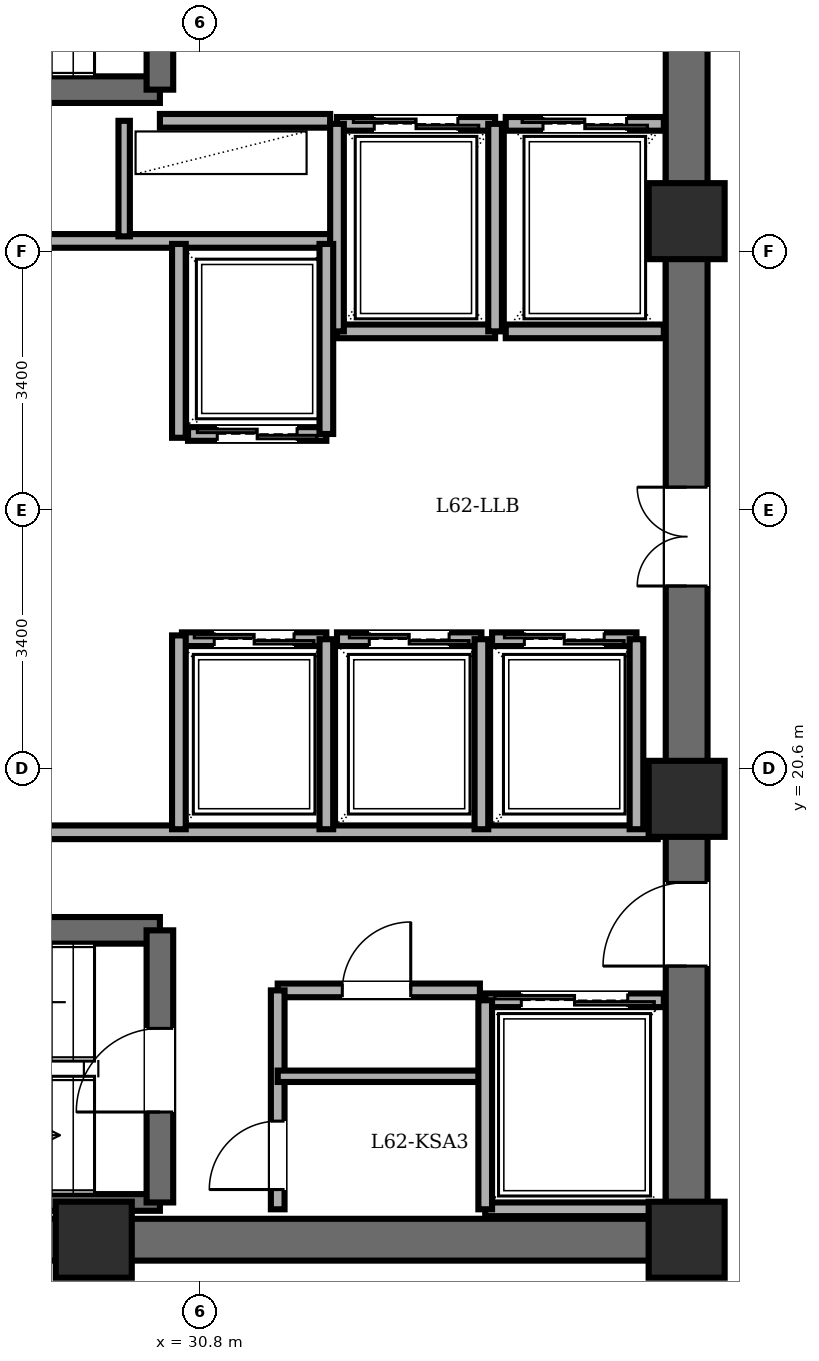
"""IFC4 building model, lengths in metres.
Left out: names, types, materials, properties, quantities, classifications, styles, units other than length and angle.
Written with IfcOpenShell. Run it as: python <this file> out.ifc"""

import sys

from ifc_helpers import new_model, si_unit, direction, frame, frame_2d, origin, origin_2d, place, context, subcontext, project, spatial, rectangle, extrude, element, fill, save


model = new_model("IFC4")
c1 = context("Model", 3, precision=1e-05, world=origin(), true_north=direction((0.0, 1.0)))
c2 = subcontext(c1, "Body", "Model", "MODEL_VIEW")
j1 = project(units=[si_unit("LENGTHUNIT", "METRE"), si_unit("PLANEANGLEUNIT", "RADIAN")], contexts=[c1])
p1 = place(None, origin())
s1 = spatial("IfcSite", under=j1, at=p1, CompositionType="ELEMENT")
p2 = place(p1, origin())
s2 = spatial("IfcBuilding", under=s1, at=p2, CompositionType="ELEMENT")
p3 = place(p2, frame((0.0, 0.0, 237.3)))
s3 = spatial("IfcBuildingStorey", under=s2, at=p3, CompositionType="ELEMENT", Elevation=237.3)
for number, where, z_axis, x_axis in (
    (1, (29.4, 14.4, 0.0), (0.0, 0.0, 1.0), (1.0, 0.0, 0.0)),
    (2, (37.2, 14.4, 0.0), (0.0, 0.0, 1.0), (1.0, 0.0, 0.0)),
    (3, (37.2, 20.2, 0.0), (0.0, 0.0, 1.0), (1.0, 0.0, 0.0)),
    (4, (37.2, 27.8, 0.0), (0.0, 0.0, 1.0), (1.0, 0.0, 0.0)),
):
    element("IfcColumn", number, at=place(p3, frame(where, z_axis=z_axis, x_axis=x_axis)), inside=s3, PredefinedType="COLUMN", context=c2, shape_type="SweptSolid", body=[
        extrude(rectangle(XDim=1.0, YDim=1.0, at=origin_2d()), origin(), (0.0, 0.0, 1.0), 3.6),
    ])
p4 = place(p3, frame((37.2, 14.4, 0.0), z_axis=(0.0, 0.0, 1.0), x_axis=(-1.0, 0.0, 0.0)))
e5 = element("IfcWall", 5, at=p4, inside=s3, PredefinedType="SHEAR", context=c2, shape_type="SweptSolid", body=[
    extrude(rectangle(XDim=15.6, YDim=0.55, at=frame_2d((7.8, 0.0))), origin(), (0.0, 0.0, 1.0), 3.4),
])
p5 = place(p3, frame((37.2, 14.4, 0.0), z_axis=(0.0, 0.0, 1.0), x_axis=(0.0, 1.0, 0.0)))
e6 = element("IfcWall", 6, at=p5, inside=s3, PredefinedType="SHEAR", context=c2, shape_type="SweptSolid", body=[
    extrude(rectangle(XDim=19.2, YDim=0.55, at=frame_2d((9.6, 0.0))), origin(), (0.0, 0.0, 1.0), 3.4),
])
p6 = place(p5, frame((15.8, 0.0, 0.0)))
e7 = element("IfcOpeningElement", 7, at=p6, cuts=e6, PredefinedType="OPENING", context=c2, shape_type="SweptSolid", body=[
    extrude(rectangle(XDim=1.15, YDim=2.15, at=frame_2d((0.575, 1.075))), frame((0.0, 0.285, 0.0), z_axis=(0.0, -1.0, 0.0), x_axis=(1.0, 0.0, 0.0)), (0.0, 0.0, 1.0), 0.57),
])
p7 = place(p5, frame((3.6, 0.0, 0.0)))
e8 = element("IfcOpeningElement", 8, at=p7, cuts=e6, PredefinedType="OPENING", context=c2, shape_type="SweptSolid", body=[
    extrude(rectangle(XDim=1.1, YDim=2.15, at=frame_2d((0.55, 1.075))), frame((0.0, 0.285, 0.0), z_axis=(0.0, -1.0, 0.0), x_axis=(1.0, 0.0, 0.0)), (0.0, 0.0, 1.0), 0.57),
])
p8 = place(p5, frame((8.6, 0.0, 0.0)))
e9 = element("IfcOpeningElement", 9, at=p8, cuts=e6, PredefinedType="OPENING", context=c2, shape_type="SweptSolid", body=[
    extrude(rectangle(XDim=1.3, YDim=2.2, at=frame_2d((0.65, 1.1))), frame((0.0, 0.285, 0.0), z_axis=(0.0, -1.0, 0.0), x_axis=(1.0, 0.0, 0.0)), (0.0, 0.0, 1.0), 0.57),
])
p9 = place(p3, frame((22.48, 29.53, 0.0), z_axis=(0.0, 0.0, 1.0), x_axis=(1.0, 0.0, 0.0)))
e10 = element("IfcWall", 10, at=p9, inside=s3, PredefinedType="SOLIDWALL", context=c2, shape_type="SweptSolid", body=[
    extrude(rectangle(XDim=7.79, YDim=0.35, at=frame_2d((3.895, 0.0))), origin(), (0.0, 0.0, 1.0), 3.4),
])
p10 = place(p3, frame((30.27, 29.53, 0.0), z_axis=(0.0, 0.0, 1.0), x_axis=(0.0, 1.0, 0.0)))
e11 = element("IfcWall", 11, at=p10, inside=s3, PredefinedType="SOLIDWALL", context=c2, shape_type="SweptSolid", body=[
    extrude(rectangle(XDim=3.58, YDim=0.35, at=frame_2d((1.79, 0.0))), origin(), (0.0, 0.0, 1.0), 3.4),
])
p11 = place(p10, frame((1.25, 0.0, 0.0)))
e12 = element("IfcOpeningElement", 12, at=p11, cuts=e11, PredefinedType="OPENING", context=c2, shape_type="SweptSolid", body=[
    extrude(rectangle(XDim=1.1, YDim=2.15, at=frame_2d((0.55, 1.075))), frame((0.0, 0.185, 0.0), z_axis=(0.0, -1.0, 0.0), x_axis=(1.0, 0.0, 0.0)), (0.0, 0.0, 1.0), 0.37),
])
p12 = place(p3, frame((22.48, 18.47, 0.0), z_axis=(0.0, 0.0, 1.0), x_axis=(1.0, 0.0, 0.0)))
e13 = element("IfcWall", 13, at=p12, inside=s3, PredefinedType="SOLIDWALL", context=c2, shape_type="SweptSolid", body=[
    extrude(rectangle(XDim=7.79, YDim=0.35, at=frame_2d((3.895, 0.0))), origin(), (0.0, 0.0, 1.0), 3.4),
])
p13 = place(p3, frame((22.48, 14.89, 0.0), z_axis=(0.0, 0.0, 1.0), x_axis=(1.0, 0.0, 0.0)))
e14 = element("IfcWall", 14, at=p13, inside=s3, PredefinedType="PARTITIONING", context=c2, shape_type="SweptSolid", body=[
    extrude(rectangle(XDim=7.79, YDim=0.22, at=frame_2d((3.895, 0.0))), origin(), (0.0, 0.0, 1.0), 3.4),
])
p14 = place(p3, frame((30.27, 14.89, 0.0), z_axis=(0.0, 0.0, 1.0), x_axis=(0.0, 1.0, 0.0)))
e15 = element("IfcWall", 15, at=p14, inside=s3, PredefinedType="SOLIDWALL", context=c2, shape_type="SweptSolid", body=[
    extrude(rectangle(XDim=3.58, YDim=0.35, at=frame_2d((1.79, 0.0))), origin(), (0.0, 0.0, 1.0), 3.4),
])
p15 = place(p14, frame((1.19, 0.0, 0.0)))
e16 = element("IfcOpeningElement", 16, at=p15, cuts=e15, PredefinedType="OPENING", context=c2, shape_type="SweptSolid", body=[
    extrude(rectangle(XDim=1.1, YDim=2.15, at=frame_2d((0.55, 1.075))), frame((0.0, 0.185, 0.0), z_axis=(0.0, -1.0, 0.0), x_axis=(1.0, 0.0, 0.0)), (0.0, 0.0, 1.0), 0.37),
])
p16 = place(p3, frame((30.27, 29.12, 0.0), z_axis=(0.0, 0.0, 1.0), x_axis=(1.0, 0.0, 0.0)))
e17 = element("IfcWall", 17, at=p16, inside=s3, PredefinedType="PARTITIONING", context=c2, shape_type="SweptSolid", body=[
    extrude(rectangle(XDim=2.24, YDim=0.18, at=frame_2d((1.12, 0.0))), origin(), (0.0, 0.0, 1.0), 3.4),
])
p17 = place(p3, frame((21.95, 27.54, 0.0), z_axis=(0.0, 0.0, 1.0), x_axis=(1.0, 0.0, 0.0)))
e18 = element("IfcWall", 18, at=p17, inside=s3, PredefinedType="PARTITIONING", context=c2, shape_type="SweptSolid", body=[
    extrude(rectangle(XDim=10.56, YDim=0.18, at=frame_2d((5.28, 0.0))), origin(), (0.0, 0.0, 1.0), 3.4),
])
p18 = place(p3, frame((29.8, 27.6, 0.0), z_axis=(0.0, 0.0, 1.0), x_axis=(0.0, 1.0, 0.0)))
e19 = element("IfcWall", 19, at=p18, inside=s3, PredefinedType="PARTITIONING", context=c2, shape_type="SweptSolid", body=[
    extrude(rectangle(XDim=1.52, YDim=0.15, at=frame_2d((0.76, 0.0))), origin(), (0.0, 0.0, 1.0), 3.4),
])
p19 = place(p3, frame((21.95, 19.76, 0.0), z_axis=(0.0, 0.0, 1.0), x_axis=(1.0, 0.0, 0.0)))
e20 = element("IfcWall", 20, at=p19, inside=s3, PredefinedType="PARTITIONING", context=c2, shape_type="SweptSolid", body=[
    extrude(rectangle(XDim=14.87, YDim=0.18, at=frame_2d((7.435, 0.0))), origin(), (0.0, 0.0, 1.0), 3.4),
])
p20 = place(p3, frame((31.82, 17.68, 0.0), z_axis=(0.0, 0.0, 1.0), x_axis=(1.0, 0.0, 0.0)))
e21 = element("IfcWall", 21, at=p20, inside=s3, PredefinedType="PARTITIONING", context=c2, shape_type="SweptSolid", body=[
    extrude(rectangle(XDim=2.66, YDim=0.18, at=frame_2d((1.33, 0.0))), origin(), (0.0, 0.0, 1.0), 3.4),
])
p21 = place(p20, frame((0.85, 0.0, 0.0)))
e22 = element("IfcOpeningElement", 22, at=p21, cuts=e21, PredefinedType="OPENING", context=c2, shape_type="SweptSolid", body=[
    extrude(rectangle(XDim=0.9, YDim=2.05, at=frame_2d((0.45, 1.025))), frame((0.0, 0.1, 0.0), z_axis=(0.0, -1.0, 0.0), x_axis=(1.0, 0.0, 0.0)), (0.0, 0.0, 1.0), 0.2),
])
p22 = place(p3, frame((31.82, 14.8, 0.0), z_axis=(0.0, 0.0, 1.0), x_axis=(0.0, 1.0, 0.0)))
e23 = element("IfcWall", 23, at=p22, inside=s3, PredefinedType="PARTITIONING", context=c2, shape_type="SweptSolid", body=[
    extrude(rectangle(XDim=2.88, YDim=0.18, at=frame_2d((1.44, 0.0))), origin(), (0.0, 0.0, 1.0), 3.4),
])
p23 = place(p22, frame((0.26, 0.0, 0.0)))
e24 = element("IfcOpeningElement", 24, at=p23, cuts=e23, PredefinedType="OPENING", context=c2, shape_type="SweptSolid", body=[
    extrude(rectangle(XDim=0.9, YDim=2.05, at=frame_2d((0.45, 1.025))), frame((0.0, 0.1, 0.0), z_axis=(0.0, -1.0, 0.0), x_axis=(1.0, 0.0, 0.0)), (0.0, 0.0, 1.0), 0.2),
])
p24 = place(p3, frame((31.82, 16.55, 0.0), z_axis=(0.0, 0.0, 1.0), x_axis=(1.0, 0.0, 0.0)))
e25 = element("IfcWall", 25, at=p24, inside=s3, PredefinedType="PARTITIONING", context=c2, shape_type="SweptSolid", body=[
    extrude(rectangle(XDim=2.66, YDim=0.15, at=frame_2d((1.33, 0.0))), origin(), (0.0, 0.0, 1.0), 3.4),
])
p25 = place(p3, frame((32.6, 29.08, 0.0), z_axis=(0.0, 0.0, 1.0), x_axis=(1.0, 0.0, 0.0)))
e26 = element("IfcWall", 26, at=p25, inside=s3, PredefinedType="PARTITIONING", context=c2, shape_type="SweptSolid", body=[
    extrude(rectangle(XDim=2.08, YDim=0.18, at=frame_2d((1.04, 0.0))), origin(), (0.0, 0.0, 1.0), 3.4),
])
p26 = place(p25, frame((0.49, 0.0, 0.0)))
e27 = element("IfcOpeningElement", 27, at=p26, cuts=e26, PredefinedType="OPENING", context=c2, shape_type="SweptSolid", body=[
    extrude(rectangle(XDim=1.1, YDim=2.2, at=frame_2d((0.55, 1.1))), frame((0.0, 0.1, 0.0), z_axis=(0.0, -1.0, 0.0), x_axis=(1.0, 0.0, 0.0)), (0.0, 0.0, 1.0), 0.2),
])
p27 = place(p3, frame((34.68, 26.35, 0.0), z_axis=(0.0, 0.0, 1.0), x_axis=(-1.0, 0.0, 0.0)))
e28 = element("IfcWall", 28, at=p27, inside=s3, PredefinedType="PARTITIONING", context=c2, shape_type="SweptSolid", body=[
    extrude(rectangle(XDim=2.08, YDim=0.18, at=frame_2d((1.04, 0.0))), origin(), (0.0, 0.0, 1.0), 3.4),
])
for number, where, z_axis, x_axis in (
    (29, (34.68, 26.35, 0.0), (0.0, 0.0, 1.0), (0.0, 1.0, 0.0)),
    (30, (32.6, 29.08, 0.0), (0.0, 0.0, 1.0), (0.0, -1.0, 0.0)),
):
    element("IfcWall", number, at=place(p3, frame(where, z_axis=z_axis, x_axis=x_axis)), inside=s3, PredefinedType="PARTITIONING", context=c2, shape_type="SweptSolid", body=[
        extrude(rectangle(XDim=2.73, YDim=0.18, at=frame_2d((1.365, 0.0))), origin(), (0.0, 0.0, 1.0), 3.4),
    ])
p28 = place(p3, frame((34.82, 29.08, 0.0), z_axis=(0.0, 0.0, 1.0), x_axis=(1.0, 0.0, 0.0)))
e31 = element("IfcWall", 31, at=p28, inside=s3, PredefinedType="PARTITIONING", context=c2, shape_type="SweptSolid", body=[
    extrude(rectangle(XDim=2.08, YDim=0.18, at=frame_2d((1.04, 0.0))), origin(), (0.0, 0.0, 1.0), 3.4),
])
p29 = place(p28, frame((0.49, 0.0, 0.0)))
e32 = element("IfcOpeningElement", 32, at=p29, cuts=e31, PredefinedType="OPENING", context=c2, shape_type="SweptSolid", body=[
    extrude(rectangle(XDim=1.1, YDim=2.2, at=frame_2d((0.55, 1.1))), frame((0.0, 0.1, 0.0), z_axis=(0.0, -1.0, 0.0), x_axis=(1.0, 0.0, 0.0)), (0.0, 0.0, 1.0), 0.2),
])
p30 = place(p3, frame((36.9, 26.35, 0.0), z_axis=(0.0, 0.0, 1.0), x_axis=(-1.0, 0.0, 0.0)))
e33 = element("IfcWall", 33, at=p30, inside=s3, PredefinedType="PARTITIONING", context=c2, shape_type="SweptSolid", body=[
    extrude(rectangle(XDim=2.08, YDim=0.18, at=frame_2d((1.04, 0.0))), origin(), (0.0, 0.0, 1.0), 3.4),
])
p31 = place(p3, frame((34.55, 17.55, 0.0), z_axis=(0.0, 0.0, 1.0), x_axis=(1.0, 0.0, 0.0)))
e34 = element("IfcWall", 34, at=p31, inside=s3, PredefinedType="PARTITIONING", context=c2, shape_type="SweptSolid", body=[
    extrude(rectangle(XDim=2.35, YDim=0.18, at=frame_2d((1.175, 0.0))), origin(), (0.0, 0.0, 1.0), 3.4),
])
p32 = place(p31, frame((0.475, 0.0, 0.0)))
e35 = element("IfcOpeningElement", 35, at=p32, cuts=e34, PredefinedType="OPENING", context=c2, shape_type="SweptSolid", body=[
    extrude(rectangle(XDim=1.4, YDim=2.3, at=frame_2d((0.7, 1.15))), frame((0.0, 0.1, 0.0), z_axis=(0.0, -1.0, 0.0), x_axis=(1.0, 0.0, 0.0)), (0.0, 0.0, 1.0), 0.2),
])
p33 = place(p3, frame((36.9, 14.8, 0.0), z_axis=(0.0, 0.0, 1.0), x_axis=(-1.0, 0.0, 0.0)))
e36 = element("IfcWall", 36, at=p33, inside=s3, PredefinedType="PARTITIONING", context=c2, shape_type="SweptSolid", body=[
    extrude(rectangle(XDim=2.35, YDim=0.18, at=frame_2d((1.175, 0.0))), origin(), (0.0, 0.0, 1.0), 3.4),
])
p34 = place(p3, frame((34.55, 17.55, 0.0), z_axis=(0.0, 0.0, 1.0), x_axis=(0.0, -1.0, 0.0)))
e37 = element("IfcWall", 37, at=p34, inside=s3, PredefinedType="PARTITIONING", context=c2, shape_type="SweptSolid", body=[
    extrude(rectangle(XDim=2.75, YDim=0.18, at=frame_2d((1.375, 0.0))), origin(), (0.0, 0.0, 1.0), 3.4),
])
p35 = place(p3, frame((32.46, 25.0, 0.0), z_axis=(0.0, 0.0, 1.0), x_axis=(-1.0, 0.0, 0.0)))
e38 = element("IfcWall", 38, at=p35, inside=s3, PredefinedType="PARTITIONING", context=c2, shape_type="SweptSolid", body=[
    extrude(rectangle(XDim=1.82, YDim=0.18, at=frame_2d((0.91, 0.0))), origin(), (0.0, 0.0, 1.0), 3.4),
])
p36 = place(p35, frame((0.385, 0.0, 0.0)))
e39 = element("IfcOpeningElement", 39, at=p36, cuts=e38, PredefinedType="OPENING", context=c2, shape_type="SweptSolid", body=[
    extrude(rectangle(XDim=1.05, YDim=2.2, at=frame_2d((0.525, 1.1))), frame((0.0, 0.1, 0.0), z_axis=(0.0, -1.0, 0.0), x_axis=(1.0, 0.0, 0.0)), (0.0, 0.0, 1.0), 0.2),
])
p37 = place(p3, frame((32.46, 25.0, 0.0), z_axis=(0.0, 0.0, 1.0), x_axis=(0.0, 1.0, 0.0)))
e40 = element("IfcWall", 40, at=p37, inside=s3, PredefinedType="PARTITIONING", context=c2, shape_type="SweptSolid", body=[
    extrude(rectangle(XDim=2.5, YDim=0.18, at=frame_2d((1.25, 0.0))), origin(), (0.0, 0.0, 1.0), 3.4),
])
p38 = place(p3, frame((30.56, 22.3, 0.0), z_axis=(0.0, 0.0, 1.0), x_axis=(1.0, 0.0, 0.0)))
e41 = element("IfcWall", 41, at=p38, inside=s3, PredefinedType="PARTITIONING", context=c2, shape_type="SweptSolid", body=[
    extrude(rectangle(XDim=1.9, YDim=0.18, at=frame_2d((0.95, 0.0))), origin(), (0.0, 0.0, 1.0), 3.4),
])
p39 = place(p38, frame((0.425, 0.0, 0.0)))
e42 = element("IfcOpeningElement", 42, at=p39, cuts=e41, PredefinedType="OPENING", context=c2, shape_type="SweptSolid", body=[
    extrude(rectangle(XDim=1.05, YDim=2.2, at=frame_2d((0.525, 1.1))), frame((0.0, 0.1, 0.0), z_axis=(0.0, -1.0, 0.0), x_axis=(1.0, 0.0, 0.0)), (0.0, 0.0, 1.0), 0.2),
])
p40 = place(p3, frame((32.46, 19.8, 0.0), z_axis=(0.0, 0.0, 1.0), x_axis=(0.0, 1.0, 0.0)))
e43 = element("IfcWall", 43, at=p40, inside=s3, PredefinedType="PARTITIONING", context=c2, shape_type="SweptSolid", body=[
    extrude(rectangle(XDim=2.5, YDim=0.18, at=frame_2d((1.25, 0.0))), origin(), (0.0, 0.0, 1.0), 3.4),
])
p41 = place(p3, frame((32.6, 22.3, 0.0), z_axis=(0.0, 0.0, 1.0), x_axis=(1.0, 0.0, 0.0)))
e44 = element("IfcWall", 44, at=p41, inside=s3, PredefinedType="PARTITIONING", context=c2, shape_type="SweptSolid", body=[
    extrude(rectangle(XDim=1.9, YDim=0.18, at=frame_2d((0.95, 0.0))), origin(), (0.0, 0.0, 1.0), 3.4),
])
p42 = place(p41, frame((0.425, 0.0, 0.0)))
e45 = element("IfcOpeningElement", 45, at=p42, cuts=e44, PredefinedType="OPENING", context=c2, shape_type="SweptSolid", body=[
    extrude(rectangle(XDim=1.05, YDim=2.2, at=frame_2d((0.525, 1.1))), frame((0.0, 0.1, 0.0), z_axis=(0.0, -1.0, 0.0), x_axis=(1.0, 0.0, 0.0)), (0.0, 0.0, 1.0), 0.2),
])
p43 = place(p3, frame((34.5, 19.8, 0.0), z_axis=(0.0, 0.0, 1.0), x_axis=(0.0, 1.0, 0.0)))
e46 = element("IfcWall", 46, at=p43, inside=s3, PredefinedType="PARTITIONING", context=c2, shape_type="SweptSolid", body=[
    extrude(rectangle(XDim=2.5, YDim=0.18, at=frame_2d((1.25, 0.0))), origin(), (0.0, 0.0, 1.0), 3.4),
])
p44 = place(p3, frame((34.64, 22.3, 0.0), z_axis=(0.0, 0.0, 1.0), x_axis=(1.0, 0.0, 0.0)))
e47 = element("IfcWall", 47, at=p44, inside=s3, PredefinedType="PARTITIONING", context=c2, shape_type="SweptSolid", body=[
    extrude(rectangle(XDim=1.9, YDim=0.18, at=frame_2d((0.95, 0.0))), origin(), (0.0, 0.0, 1.0), 3.4),
])
p45 = place(p44, frame((0.425, 0.0, 0.0)))
e48 = element("IfcOpeningElement", 48, at=p45, cuts=e47, PredefinedType="OPENING", context=c2, shape_type="SweptSolid", body=[
    extrude(rectangle(XDim=1.05, YDim=2.2, at=frame_2d((0.525, 1.1))), frame((0.0, 0.1, 0.0), z_axis=(0.0, -1.0, 0.0), x_axis=(1.0, 0.0, 0.0)), (0.0, 0.0, 1.0), 0.2),
])
p46 = place(p3, frame((36.54, 19.8, 0.0), z_axis=(0.0, 0.0, 1.0), x_axis=(0.0, 1.0, 0.0)))
e49 = element("IfcWall", 49, at=p46, inside=s3, PredefinedType="PARTITIONING", context=c2, shape_type="SweptSolid", body=[
    extrude(rectangle(XDim=2.5, YDim=0.18, at=frame_2d((1.25, 0.0))), origin(), (0.0, 0.0, 1.0), 3.4),
])
for number, where, z_axis, x_axis in (
    (50, (30.52, 24.95, 0.0), (0.0, 0.0, 1.0), (0.0, 1.0, 0.0)),
    (51, (30.52, 19.8, 0.0), (0.0, 0.0, 1.0), (0.0, 1.0, 0.0)),
):
    element("IfcWall", number, at=place(p3, frame(where, z_axis=z_axis, x_axis=x_axis)), inside=s3, PredefinedType="PARTITIONING", context=c2, shape_type="SweptSolid", body=[
        extrude(rectangle(XDim=2.55, YDim=0.18, at=frame_2d((1.275, 0.0))), origin(), (0.0, 0.0, 1.0), 3.4),
    ])
p47 = place(p15, origin())
e52 = element("IfcDoor", 52, at=p47, inside=s3, OperationType="SINGLE_SWING_LEFT", PredefinedType="DOOR", context=c2, shape_type="SweptSolid", body=[
    extrude(rectangle(XDim=1.1, YDim=2.15, at=frame_2d((0.55, 1.075))), frame((0.0, 0.025, 0.0), z_axis=(0.0, -1.0, 0.0), x_axis=(1.0, 0.0, 0.0)), (0.0, 0.0, 1.0), 0.05),
])
fill(e16, e52)
p48 = place(p7, origin())
e53 = element("IfcDoor", 53, at=p48, inside=s3, OperationType="SINGLE_SWING_LEFT", PredefinedType="DOOR", context=c2, shape_type="SweptSolid", body=[
    extrude(rectangle(XDim=1.1, YDim=2.15, at=frame_2d((0.55, 1.075))), frame((0.0, 0.025, 0.0), z_axis=(0.0, -1.0, 0.0), x_axis=(1.0, 0.0, 0.0)), (0.0, 0.0, 1.0), 0.05),
])
fill(e8, e53)
p49 = place(p21, origin())
e54 = element("IfcDoor", 54, at=p49, inside=s3, OperationType="SINGLE_SWING_RIGHT", PredefinedType="DOOR", context=c2, shape_type="SweptSolid", body=[
    extrude(rectangle(XDim=0.9, YDim=2.05, at=frame_2d((0.45, 1.025))), frame((0.0, 0.025, 0.0), z_axis=(0.0, -1.0, 0.0), x_axis=(1.0, 0.0, 0.0)), (0.0, 0.0, 1.0), 0.05),
])
fill(e22, e54)
p50 = place(p23, origin())
e55 = element("IfcDoor", 55, at=p50, inside=s3, OperationType="SINGLE_SWING_LEFT", PredefinedType="DOOR", context=c2, shape_type="SweptSolid", body=[
    extrude(rectangle(XDim=0.9, YDim=2.05, at=frame_2d((0.45, 1.025))), frame((0.0, 0.025, 0.0), z_axis=(0.0, -1.0, 0.0), x_axis=(1.0, 0.0, 0.0)), (0.0, 0.0, 1.0), 0.05),
])
fill(e24, e55)
p51 = place(p26, origin())
e56 = element("IfcDoor", 56, at=p51, inside=s3, OperationType="DOUBLE_DOOR_SLIDING", PredefinedType="DOOR", context=c2, shape_type="SweptSolid", body=[
    extrude(rectangle(XDim=1.1, YDim=2.2, at=frame_2d((0.55, 1.1))), frame((0.0, 0.025, 0.0), z_axis=(0.0, -1.0, 0.0), x_axis=(1.0, 0.0, 0.0)), (0.0, 0.0, 1.0), 0.05),
])
fill(e27, e56)
p52 = place(p29, origin())
e57 = element("IfcDoor", 57, at=p52, inside=s3, OperationType="DOUBLE_DOOR_SLIDING", PredefinedType="DOOR", context=c2, shape_type="SweptSolid", body=[
    extrude(rectangle(XDim=1.1, YDim=2.2, at=frame_2d((0.55, 1.1))), frame((0.0, 0.025, 0.0), z_axis=(0.0, -1.0, 0.0), x_axis=(1.0, 0.0, 0.0)), (0.0, 0.0, 1.0), 0.05),
])
fill(e32, e57)
p53 = place(p32, origin())
e58 = element("IfcDoor", 58, at=p53, inside=s3, OperationType="DOUBLE_DOOR_SLIDING", PredefinedType="DOOR", context=c2, shape_type="SweptSolid", body=[
    extrude(rectangle(XDim=1.4, YDim=2.3, at=frame_2d((0.7, 1.15))), frame((0.0, 0.025, 0.0), z_axis=(0.0, -1.0, 0.0), x_axis=(1.0, 0.0, 0.0)), (0.0, 0.0, 1.0), 0.05),
])
fill(e35, e58)
p54 = place(p36, origin())
e59 = element("IfcDoor", 59, at=p54, inside=s3, OperationType="DOUBLE_DOOR_SLIDING", PredefinedType="DOOR", context=c2, shape_type="SweptSolid", body=[
    extrude(rectangle(XDim=1.05, YDim=2.2, at=frame_2d((0.525, 1.1))), frame((0.0, 0.025, 0.0), z_axis=(0.0, -1.0, 0.0), x_axis=(1.0, 0.0, 0.0)), (0.0, 0.0, 1.0), 0.05),
])
fill(e39, e59)
p55 = place(p39, origin())
e60 = element("IfcDoor", 60, at=p55, inside=s3, OperationType="DOUBLE_DOOR_SLIDING", PredefinedType="DOOR", context=c2, shape_type="SweptSolid", body=[
    extrude(rectangle(XDim=1.05, YDim=2.2, at=frame_2d((0.525, 1.1))), frame((0.0, 0.025, 0.0), z_axis=(0.0, -1.0, 0.0), x_axis=(1.0, 0.0, 0.0)), (0.0, 0.0, 1.0), 0.05),
])
fill(e42, e60)
p56 = place(p42, origin())
e61 = element("IfcDoor", 61, at=p56, inside=s3, OperationType="DOUBLE_DOOR_SLIDING", PredefinedType="DOOR", context=c2, shape_type="SweptSolid", body=[
    extrude(rectangle(XDim=1.05, YDim=2.2, at=frame_2d((0.525, 1.1))), frame((0.0, 0.025, 0.0), z_axis=(0.0, -1.0, 0.0), x_axis=(1.0, 0.0, 0.0)), (0.0, 0.0, 1.0), 0.05),
])
fill(e45, e61)
p57 = place(p45, origin())
e62 = element("IfcDoor", 62, at=p57, inside=s3, OperationType="DOUBLE_DOOR_SLIDING", PredefinedType="DOOR", context=c2, shape_type="SweptSolid", body=[
    extrude(rectangle(XDim=1.05, YDim=2.2, at=frame_2d((0.525, 1.1))), frame((0.0, 0.025, 0.0), z_axis=(0.0, -1.0, 0.0), x_axis=(1.0, 0.0, 0.0)), (0.0, 0.0, 1.0), 0.05),
])
fill(e48, e62)
p58 = place(p8, origin())
e63 = element("IfcDoor", 63, at=p58, inside=s3, OperationType="DOUBLE_DOOR_SINGLE_SWING", PredefinedType="DOOR", context=c2, shape_type="SweptSolid", body=[
    extrude(rectangle(XDim=1.3, YDim=2.2, at=frame_2d((0.65, 1.1))), frame((0.0, 0.025, 0.0), z_axis=(0.0, -1.0, 0.0), x_axis=(1.0, 0.0, 0.0)), (0.0, 0.0, 1.0), 0.05),
])
fill(e9, e63)
save(model, sys.argv[1])
